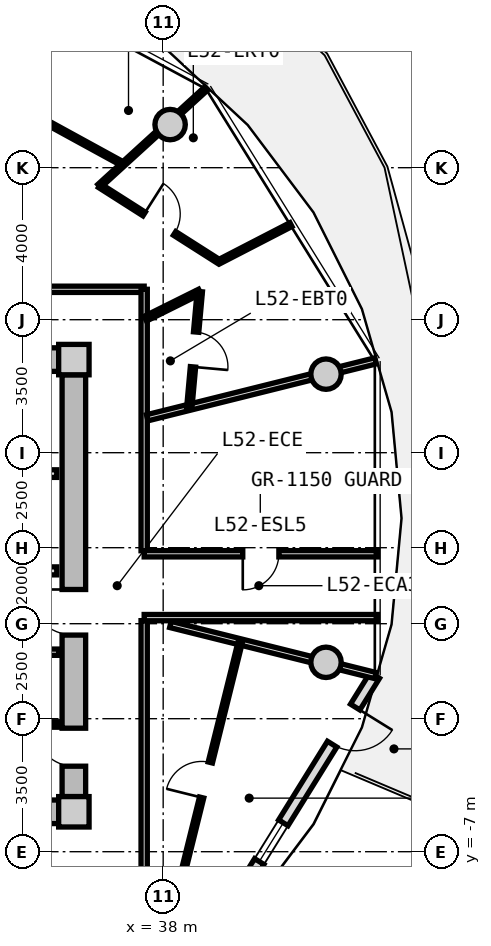
"""IFC4 building model, lengths in metres.
Left out: names, types, materials, properties, quantities, classifications, styles, units other than length and angle.
Written with IfcOpenShell. Run it as: python <this file> out.ifc"""

import sys

from ifc_helpers import new_model, si_unit, direction, frame, frame_2d, origin, origin_2d, place, context, subcontext, project, spatial, rectangle, circle, extrude, source, transform, mapped, element, fill, save


model = new_model("IFC4")
c1 = context("Model", 3, precision=1e-05, world=origin(), true_north=direction((0.0, 1.0)))
c2 = subcontext(c1, "Body", "Model", "MODEL_VIEW")
j1 = project(units=[si_unit("LENGTHUNIT", "METRE"), si_unit("PLANEANGLEUNIT", "RADIAN")], contexts=[c1])
p1 = place(None, origin())
s1 = spatial("IfcSite", under=j1, at=p1, CompositionType="ELEMENT")
p2 = place(p1, origin())
s2 = spatial("IfcBuilding", under=s1, at=p2, CompositionType="ELEMENT")
p3 = place(p2, frame((0.0, 0.0, 167.85)))
s3 = spatial("IfcBuildingStorey", under=s2, at=p3, CompositionType="ELEMENT", Elevation=167.85)
m1 = source(origin(), c2, "Body", "SweptSolid", [
    extrude(rectangle(XDim=0.8, YDim=0.8, at=origin_2d()), origin(), (0.0, 0.0, 1.0), 3.05),
])
for number, where, z_axis, x_axis in (
    (1, (35.65, -5.95, 0.0), (0.0, 0.0, 1.0), (1.0, 0.0, 0.0)),
    (2, (35.65, 5.95, 0.0), (0.0, 0.0, 1.0), (1.0, 0.0, 0.0)),
):
    element("IfcColumn", number, at=place(p3, frame(where, z_axis=z_axis, x_axis=x_axis)), inside=s3, PredefinedType="COLUMN", context=c2, shape_type="MappedRepresentation", body=[
        mapped(m1, transform((0.0, 0.0, 0.0), x_axis=(1.0, 0.0, 0.0), y_axis=(0.0, 1.0, 0.0), z_axis=(0.0, 0.0, 1.0), scale=1.0)),
    ])
m2 = source(origin(), c2, "Body", "SweptSolid", [
    extrude(rectangle(XDim=14.5, YDim=0.62, at=frame_2d((7.25, 0.0))), origin(), (0.0, 0.0, 1.0), 2.81),
])
for number, where, z_axis, x_axis in (
    (3, (20.75, 5.95, 0.0), (0.0, 0.0, 1.0), (1.0, 0.0, 0.0)),
    (4, (35.25, -5.95, 0.0), (0.0, 0.0, 1.0), (-1.0, 0.0, 0.0)),
):
    element("IfcWall", number, at=place(p3, frame(where, z_axis=z_axis, x_axis=x_axis)), inside=s3, PredefinedType="SHEAR", context=c2, shape_type="MappedRepresentation", body=[
        mapped(m2, transform((0.0, 0.0, 0.0), x_axis=(1.0, 0.0, 0.0), y_axis=(0.0, 1.0, 0.0), z_axis=(0.0, 0.0, 1.0), scale=1.0)),
    ])
m3 = source(origin(), c2, "Body", "SweptSolid", [
    extrude(rectangle(XDim=11.1, YDim=0.62, at=frame_2d((5.55, 0.0))), origin(), (0.0, 0.0, 1.0), 2.81),
])
p4 = place(p3, frame((35.65, 5.55, 0.0), z_axis=(0.0, 0.0, 1.0), x_axis=(0.0, -1.0, 0.0)))
e5 = element("IfcWall", 5, at=p4, inside=s3, PredefinedType="SHEAR", context=c2, shape_type="MappedRepresentation", body=[
    mapped(m3, transform((0.0, 0.0, 0.0), x_axis=(1.0, 0.0, 0.0), y_axis=(0.0, 1.0, 0.0), z_axis=(0.0, 0.0, 1.0), scale=1.0)),
])
p5 = place(p4, frame((5.65, 0.0, 0.0)))
e6 = element("IfcOpeningElement", 6, at=p5, cuts=e5, PredefinedType="OPENING", context=c2, shape_type="SweptSolid", body=[
    extrude(rectangle(XDim=1.2, YDim=2.15, at=frame_2d((0.6, 1.075))), frame((0.0, 0.32, 0.0), z_axis=(0.0, -1.0, 0.0), x_axis=(1.0, 0.0, 0.0)), (0.0, 0.0, 1.0), 0.64),
])
p6 = place(p4, frame((9.3, 0.0, 0.0)))
e7 = element("IfcOpeningElement", 7, at=p6, cuts=e5, PredefinedType="OPENING", context=c2, shape_type="SweptSolid", body=[
    extrude(rectangle(XDim=1.0, YDim=2.1, at=frame_2d((0.5, 1.05))), frame((0.0, 0.32, 0.0), z_axis=(0.0, -1.0, 0.0), x_axis=(1.0, 0.0, 0.0)), (0.0, 0.0, 1.0), 0.64),
])
m4 = source(origin(), c2, "Body", "SweptSolid", [
    extrude(circle(Radius=0.4, at=origin_2d()), origin(), (0.0, 0.0, 1.0), 3.05),
])
for number, where, z_axis, x_axis in (
    (8, (42.285, 5.567, 0.0), (0.0, 0.0, 1.0), (1.0, 0.0, 0.0)),
    (9, (38.183, 12.135, 0.0), (0.0, 0.0, 1.0), (1.0, 0.0, 0.0)),
    (10, (42.285, -2.016, 0.0), (0.0, 0.0, 1.0), (1.0, 0.0, 0.0)),
):
    element("IfcColumn", number, at=place(p3, frame(where, z_axis=z_axis, x_axis=x_axis)), inside=s3, PredefinedType="COLUMN", context=c2, shape_type="MappedRepresentation", body=[
        mapped(m4, transform((0.0, 0.0, 0.0), x_axis=(1.0, 0.0, 0.0), y_axis=(0.0, 1.0, 0.0), z_axis=(0.0, 0.0, 1.0), scale=1.0)),
    ])
m5 = source(origin(), c2, "Body", "SweptSolid", [
    extrude(rectangle(XDim=8.431, YDim=0.29, at=frame_2d((4.216, 0.0))), origin(), (0.0, 0.0, 1.0), 2.81),
])
p7 = place(p3, frame((43.57, -2.361, 0.0), z_axis=(0.0, 0.0, 1.0), x_axis=(-0.527377998418, -0.849630770855, 0.0)))
e11 = element("IfcWall", 11, at=p7, inside=s3, PredefinedType="SOLIDWALL", context=c2, shape_type="MappedRepresentation", body=[
    mapped(m5, transform((0.0, 0.0, 0.0), x_axis=(1.0, 0.0, 0.0), y_axis=(0.0, 1.0, 0.0), z_axis=(0.0, 0.0, 1.0), scale=1.0)),
])
p8 = place(p7, frame((0.98, 0.0, 0.0)))
e12 = element("IfcOpeningElement", 12, at=p8, cuts=e11, PredefinedType="OPENING", context=c2, shape_type="SweptSolid", body=[
    extrude(rectangle(XDim=1.15, YDim=2.25, at=frame_2d((0.575, 1.125))), frame((0.0, 0.155, 0.0), z_axis=(0.0, -1.0, 0.0), x_axis=(1.0, 0.0, 0.0)), (0.0, 0.0, 1.0), 0.31),
])
p9 = place(p7, frame((4.566, 0.0, 0.85)))
e13 = element("IfcOpeningElement", 13, at=p9, cuts=e11, PredefinedType="OPENING", context=c2, shape_type="SweptSolid", body=[
    extrude(rectangle(XDim=1.2, YDim=1.5, at=frame_2d((0.6, 0.75))), frame((0.0, 0.155, 0.0), z_axis=(0.0, -1.0, 0.0), x_axis=(1.0, 0.0, 0.0)), (0.0, 0.0, 1.0), 0.31),
])
m6 = source(origin(), c2, "Body", "SweptSolid", [
    extrude(rectangle(XDim=3.2, YDim=0.2, at=frame_2d((1.6, 0.0))), origin(), (0.0, 0.0, 1.0), 2.795),
])
p10 = place(p3, frame((32.0, 2.95, 0.0), z_axis=(0.0, 0.0, 1.0), x_axis=(1.0, 0.0, 0.0)))
e14 = element("IfcWall", 14, at=p10, inside=s3, PredefinedType="PARTITIONING", context=c2, shape_type="MappedRepresentation", body=[
    mapped(m6, transform((0.0, 0.0, 0.0), x_axis=(1.0, 0.0, 0.0), y_axis=(0.0, 1.0, 0.0), z_axis=(0.0, 0.0, 1.0), scale=1.0)),
])
m7 = source(origin(), c2, "Body", "SweptSolid", [
    extrude(rectangle(XDim=6.66, YDim=0.21, at=frame_2d((3.33, 0.0))), origin(), (0.0, 0.0, 1.0), 2.795),
])
p11 = place(p3, frame((28.54, 0.39, 0.0), z_axis=(0.0, 0.0, 1.0), x_axis=(1.0, 0.0, 0.0)))
e15 = element("IfcWall", 15, at=p11, inside=s3, PredefinedType="PARTITIONING", context=c2, shape_type="MappedRepresentation", body=[
    mapped(m7, transform((0.0, 0.0, 0.0), x_axis=(1.0, 0.0, 0.0), y_axis=(0.0, 1.0, 0.0), z_axis=(0.0, 0.0, 1.0), scale=1.0)),
])
p12 = place(p11, frame((1.0, 0.0, 0.0)))
e16 = element("IfcOpeningElement", 16, at=p12, cuts=e15, PredefinedType="OPENING", context=c2, shape_type="SweptSolid", body=[
    extrude(rectangle(XDim=1.2, YDim=2.15, at=frame_2d((0.6, 1.075))), frame((0.0, 0.115, 0.0), z_axis=(0.0, -1.0, 0.0), x_axis=(1.0, 0.0, 0.0)), (0.0, 0.0, 1.0), 0.23),
])
m8 = source(origin(), c2, "Body", "SweptSolid", [
    extrude(rectangle(XDim=2.7, YDim=0.165, at=frame_2d((1.35, 0.0))), origin(), (0.0, 0.0, 1.0), 2.795),
])
p13 = place(p3, frame((32.55, -1.75, 0.0), z_axis=(0.0, 0.0, 1.0), x_axis=(1.0, 0.0, 0.0)))
e17 = element("IfcWall", 17, at=p13, inside=s3, PredefinedType="PARTITIONING", context=c2, shape_type="MappedRepresentation", body=[
    mapped(m8, transform((0.0, 0.0, 0.0), x_axis=(1.0, 0.0, 0.0), y_axis=(0.0, 1.0, 0.0), z_axis=(0.0, 0.0, 1.0), scale=1.0)),
])
p14 = place(p13, frame((0.85, 0.0, 0.0)))
e18 = element("IfcOpeningElement", 18, at=p14, cuts=e17, PredefinedType="OPENING", context=c2, shape_type="SweptSolid", body=[
    extrude(rectangle(XDim=0.925, YDim=2.1, at=frame_2d((0.462, 1.05))), frame((0.0, 0.093, 0.0), z_axis=(0.0, -1.0, 0.0), x_axis=(1.0, 0.0, 0.0)), (0.0, 0.0, 1.0), 0.185),
])
m9 = source(origin(), c2, "Body", "SweptSolid", [
    extrude(rectangle(XDim=2.7, YDim=0.14, at=frame_2d((1.35, 0.0))), origin(), (0.0, 0.0, 1.0), 2.795),
])
p15 = place(p3, frame((32.55, -3.65, 0.0), z_axis=(0.0, 0.0, 1.0), x_axis=(1.0, 0.0, 0.0)))
e19 = element("IfcWall", 19, at=p15, inside=s3, PredefinedType="PARTITIONING", context=c2, shape_type="MappedRepresentation", body=[
    mapped(m9, transform((0.0, 0.0, 0.0), x_axis=(1.0, 0.0, 0.0), y_axis=(0.0, 1.0, 0.0), z_axis=(0.0, 0.0, 1.0), scale=1.0)),
])
m10 = source(origin(), c2, "Body", "SweptSolid", [
    extrude(rectangle(XDim=8.719, YDim=0.165, at=frame_2d((4.36, 0.0))), origin(), (0.0, 0.0, 1.0), 2.795),
])
p16 = place(p3, frame((28.781, 7.8, 0.0), z_axis=(0.0, 0.0, 1.0), x_axis=(1.0, 0.0, 0.0)))
e20 = element("IfcWall", 20, at=p16, inside=s3, PredefinedType="PARTITIONING", context=c2, shape_type="MappedRepresentation", body=[
    mapped(m10, transform((0.0, 0.0, 0.0), x_axis=(1.0, 0.0, 0.0), y_axis=(0.0, 1.0, 0.0), z_axis=(0.0, 0.0, 1.0), scale=1.0)),
])
p17 = place(p16, frame((3.835, 0.0, 0.0)))
e21 = element("IfcOpeningElement", 21, at=p17, cuts=e20, PredefinedType="OPENING", context=c2, shape_type="SweptSolid", body=[
    extrude(rectangle(XDim=1.05, YDim=2.15, at=frame_2d((0.525, 1.075))), frame((0.0, 0.093, 0.0), z_axis=(0.0, -1.0, 0.0), x_axis=(1.0, 0.0, 0.0)), (0.0, 0.0, 1.0), 0.185),
])
m11 = source(origin(), c2, "Body", "SweptSolid", [
    extrude(rectangle(XDim=6.88, YDim=0.165, at=frame_2d((3.44, 0.0))), origin(), (0.0, 0.0, 1.0), 2.795),
])
for number, where, z_axis, x_axis in (
    (22, (37.5, 7.8, 0.0), (0.0, 0.0, 1.0), (0.0, -1.0, 0.0)),
    (23, (37.5, -0.92, 0.0), (0.0, 0.0, 1.0), (0.0, -1.0, 0.0)),
):
    element("IfcWall", number, at=place(p3, frame(where, z_axis=z_axis, x_axis=x_axis)), inside=s3, PredefinedType="PARTITIONING", context=c2, shape_type="MappedRepresentation", body=[
        mapped(m11, transform((0.0, 0.0, 0.0), x_axis=(1.0, 0.0, 0.0), y_axis=(0.0, 1.0, 0.0), z_axis=(0.0, 0.0, 1.0), scale=1.0)),
    ])
m12 = source(origin(), c2, "Body", "SweptSolid", [
    extrude(rectangle(XDim=5.564, YDim=0.165, at=frame_2d((2.782, 0.0))), origin(), (0.0, 0.0, 1.0), 2.345),
])
p18 = place(p3, frame((38.19, -1.02, 0.0), z_axis=(0.0, 0.0, 1.0), x_axis=(0.97031260977, -0.241854169533, 0.0)))
e24 = element("IfcWall", 24, at=p18, inside=s3, PredefinedType="PARTITIONING", context=c2, shape_type="MappedRepresentation", body=[
    mapped(m12, transform((0.0, 0.0, 0.0), x_axis=(1.0, 0.0, 0.0), y_axis=(0.0, 1.0, 0.0), z_axis=(0.0, 0.0, 1.0), scale=1.0)),
])
m13 = source(origin(), c2, "Body", "SweptSolid", [
    extrude(rectangle(XDim=6.193, YDim=0.165, at=frame_2d((3.096, 0.0))), origin(), (0.0, 0.0, 1.0), 2.345),
])
p19 = place(p3, frame((37.58, 4.419, 0.0), z_axis=(0.0, 0.0, 1.0), x_axis=(0.970309243466, 0.241867674657, 0.0)))
e25 = element("IfcWall", 25, at=p19, inside=s3, PredefinedType="PARTITIONING", context=c2, shape_type="MappedRepresentation", body=[
    mapped(m13, transform((0.0, 0.0, 0.0), x_axis=(1.0, 0.0, 0.0), y_axis=(0.0, 1.0, 0.0), z_axis=(0.0, 0.0, 1.0), scale=1.0)),
])
m14 = source(origin(), c2, "Body", "SweptSolid", [
    extrude(rectangle(XDim=6.139, YDim=0.165, at=frame_2d((3.069, 0.0))), origin(), (0.0, 0.0, 1.0), 2.795),
])
p20 = place(p3, frame((37.5, 0.84, 0.0), z_axis=(0.0, 0.0, 1.0), x_axis=(1.0, 0.0, 0.0)))
e26 = element("IfcWall", 26, at=p20, inside=s3, PredefinedType="PARTITIONING", context=c2, shape_type="MappedRepresentation", body=[
    mapped(m14, transform((0.0, 0.0, 0.0), x_axis=(1.0, 0.0, 0.0), y_axis=(0.0, 1.0, 0.0), z_axis=(0.0, 0.0, 1.0), scale=1.0)),
])
p21 = place(p20, frame((2.594, 0.0, 0.0)))
e27 = element("IfcOpeningElement", 27, at=p21, cuts=e26, PredefinedType="OPENING", context=c2, shape_type="SweptSolid", body=[
    extrude(rectangle(XDim=0.95, YDim=2.1, at=frame_2d((0.475, 1.05))), frame((0.0, 0.093, 0.0), z_axis=(0.0, -1.0, 0.0), x_axis=(1.0, 0.0, 0.0)), (0.0, 0.0, 1.0), 0.185),
])
p22 = place(p3, frame((43.639, -0.84, 0.0), z_axis=(0.0, 0.0, 1.0), x_axis=(-1.0, 0.0, 0.0)))
e28 = element("IfcWall", 28, at=p22, inside=s3, PredefinedType="PARTITIONING", context=c2, shape_type="MappedRepresentation", body=[
    mapped(m14, transform((0.0, 0.0, 0.0), x_axis=(1.0, 0.0, 0.0), y_axis=(0.0, 1.0, 0.0), z_axis=(0.0, 0.0, 1.0), scale=1.0)),
])
m15 = source(origin(), c2, "Body", "SweptSolid", [
    extrude(rectangle(XDim=7.167, YDim=0.115, at=frame_2d((3.583, 0.0))), origin(), (0.0, 0.0, 1.0), 2.795),
])
p23 = place(p3, frame((36.939, 11.098, 0.0), z_axis=(0.0, 0.0, 1.0), x_axis=(-0.8771628907, 0.480192943699, 0.0)))
e29 = element("IfcWall", 29, at=p23, inside=s3, PredefinedType="PARTITIONING", context=c2, shape_type="MappedRepresentation", body=[
    mapped(m15, transform((0.0, 0.0, 0.0), x_axis=(1.0, 0.0, 0.0), y_axis=(0.0, 1.0, 0.0), z_axis=(0.0, 0.0, 1.0), scale=1.0)),
])
p24 = place(p23, frame((3.108, 0.0, 0.0)))
e30 = element("IfcOpeningElement", 30, at=p24, cuts=e29, PredefinedType="OPENING", context=c2, shape_type="SweptSolid", body=[
    extrude(rectangle(XDim=0.95, YDim=2.1, at=frame_2d((0.475, 1.05))), frame((0.0, 0.067, 0.0), z_axis=(0.0, -1.0, 0.0), x_axis=(1.0, 0.0, 0.0)), (0.0, 0.0, 1.0), 0.135),
])
m16 = source(origin(), c2, "Body", "SweptSolid", [
    extrude(rectangle(XDim=3.814, YDim=0.115, at=frame_2d((1.907, 0.0))), origin(), (0.0, 0.0, 1.0), 2.435),
])
p25 = place(p3, frame((36.319, 10.518, 0.0), z_axis=(0.0, 0.0, 1.0), x_axis=(0.73871962024, 0.674012850524, 0.0)))
e31 = element("IfcWall", 31, at=p25, inside=s3, PredefinedType="PARTITIONING", context=c2, shape_type="MappedRepresentation", body=[
    mapped(m16, transform((0.0, 0.0, 0.0), x_axis=(1.0, 0.0, 0.0), y_axis=(0.0, 1.0, 0.0), z_axis=(0.0, 0.0, 1.0), scale=1.0)),
])
m17 = source(origin(), c2, "Body", "SweptSolid", [
    extrude(rectangle(XDim=1.601, YDim=0.14, at=frame_2d((0.801, 0.0))), origin(), (0.0, 0.0, 1.0), 2.795),
])
p26 = place(p3, frame((37.53, 7.026, 0.0), z_axis=(0.0, 0.0, 1.0), x_axis=(0.895279369592, 0.445505163138, 0.0)))
e32 = element("IfcWall", 32, at=p26, inside=s3, PredefinedType="PARTITIONING", context=c2, shape_type="MappedRepresentation", body=[
    mapped(m17, transform((0.0, 0.0, 0.0), x_axis=(1.0, 0.0, 0.0), y_axis=(0.0, 1.0, 0.0), z_axis=(0.0, 0.0, 1.0), scale=1.0)),
])
m18 = source(origin(), c2, "Body", "SweptSolid", [
    extrude(rectangle(XDim=3.058, YDim=0.14, at=frame_2d((1.529, 0.0))), origin(), (0.0, 0.0, 1.0), 2.795),
])
p27 = place(p3, frame((38.964, 7.74, 0.0), z_axis=(0.0, 0.0, 1.0), x_axis=(-0.090060616512, -0.99593628579, 0.0)))
e33 = element("IfcWall", 33, at=p27, inside=s3, PredefinedType="PARTITIONING", context=c2, shape_type="MappedRepresentation", body=[
    mapped(m18, transform((0.0, 0.0, 0.0), x_axis=(1.0, 0.0, 0.0), y_axis=(0.0, 1.0, 0.0), z_axis=(0.0, 0.0, 1.0), scale=1.0)),
])
p28 = place(p27, frame((1.069, 0.0, 0.0)))
e34 = element("IfcOpeningElement", 34, at=p28, cuts=e33, PredefinedType="OPENING", context=c2, shape_type="SweptSolid", body=[
    extrude(rectangle(XDim=0.92, YDim=2.1, at=frame_2d((0.46, 1.05))), frame((0.0, 0.08, 0.0), z_axis=(0.0, -1.0, 0.0), x_axis=(1.0, 0.0, 0.0)), (0.0, 0.0, 1.0), 0.16),
])
m19 = source(origin(), c2, "Body", "SweptSolid", [
    extrude(rectangle(XDim=2.13, YDim=0.115, at=frame_2d((1.065, 0.0))), origin(), (0.0, 0.0, 1.0), 2.795),
])
p29 = place(p3, frame((39.471, 8.525, 0.0), z_axis=(0.0, 0.0, 1.0), x_axis=(0.888504584778, 0.458867740016, 0.0)))
e35 = element("IfcWall", 35, at=p29, inside=s3, PredefinedType="PARTITIONING", context=c2, shape_type="MappedRepresentation", body=[
    mapped(m19, transform((0.0, 0.0, 0.0), x_axis=(1.0, 0.0, 0.0), y_axis=(0.0, 1.0, 0.0), z_axis=(0.0, 0.0, 1.0), scale=1.0)),
])
m20 = source(origin(), c2, "Body", "SweptSolid", [
    extrude(rectangle(XDim=3.725, YDim=0.115, at=frame_2d((1.863, 0.0))), origin(), (0.0, 0.0, 1.0), 2.795),
])
p30 = place(p3, frame((39.471, 8.525, 0.0), z_axis=(0.0, 0.0, 1.0), x_axis=(-0.843453635564, 0.537201977523, 0.0)))
e36 = element("IfcWall", 36, at=p30, inside=s3, PredefinedType="PARTITIONING", context=c2, shape_type="MappedRepresentation", body=[
    mapped(m20, transform((0.0, 0.0, 0.0), x_axis=(1.0, 0.0, 0.0), y_axis=(0.0, 1.0, 0.0), z_axis=(0.0, 0.0, 1.0), scale=1.0)),
])
p31 = place(p30, frame((1.388, 0.0, 0.0)))
e37 = element("IfcOpeningElement", 37, at=p31, cuts=e36, PredefinedType="OPENING", context=c2, shape_type="SweptSolid", body=[
    extrude(rectangle(XDim=0.95, YDim=2.1, at=frame_2d((0.475, 1.05))), frame((0.0, 0.067, 0.0), z_axis=(0.0, -1.0, 0.0), x_axis=(1.0, 0.0, 0.0)), (0.0, 0.0, 1.0), 0.135),
])
m21 = source(origin(), c2, "Body", "SweptSolid", [
    extrude(rectangle(XDim=7.492, YDim=0.115, at=frame_2d((3.746, 0.0))), origin(), (0.0, 0.0, 1.0), 2.345),
])
p32 = place(p3, frame((38.223, -8.749, 0.0), z_axis=(0.0, 0.0, 1.0), x_axis=(0.24104782819, 0.970513237686, 0.0)))
e38 = element("IfcWall", 38, at=p32, inside=s3, PredefinedType="PARTITIONING", context=c2, shape_type="MappedRepresentation", body=[
    mapped(m21, transform((0.0, 0.0, 0.0), x_axis=(1.0, 0.0, 0.0), y_axis=(0.0, 1.0, 0.0), z_axis=(0.0, 0.0, 1.0), scale=1.0)),
])
p33 = place(p32, frame((3.271, 0.0, 0.0)))
e39 = element("IfcOpeningElement", 39, at=p33, cuts=e38, PredefinedType="OPENING", context=c2, shape_type="SweptSolid", body=[
    extrude(rectangle(XDim=0.95, YDim=2.1, at=frame_2d((0.475, 1.05))), frame((0.0, 0.067, 0.0), z_axis=(0.0, -1.0, 0.0), x_axis=(1.0, 0.0, 0.0)), (0.0, 0.0, 1.0), 0.135),
])
m22 = source(origin(), c2, "Body", "SweptSolid", [
    extrude(rectangle(XDim=1.15, YDim=2.25, at=frame_2d((0.575, 1.125))), frame((0.0, 0.025, 0.0), z_axis=(0.0, -1.0, 0.0), x_axis=(1.0, 0.0, 0.0)), (0.0, 0.0, 1.0), 0.05),
])
p34 = place(p8, origin())
e40 = element("IfcDoor", 40, at=p34, inside=s3, OperationType="SINGLE_SWING_LEFT", PredefinedType="DOOR", context=c2, shape_type="MappedRepresentation", body=[
    mapped(m22, transform((0.0, 0.0, 0.0), x_axis=(1.0, 0.0, 0.0), y_axis=(0.0, 1.0, 0.0), z_axis=(0.0, 0.0, 1.0), scale=1.0)),
])
fill(e12, e40)
m23 = source(origin(), c2, "Body", "SweptSolid", [
    extrude(rectangle(XDim=1.2, YDim=1.5, at=frame_2d((0.6, 0.75))), frame((0.0, 0.03, 0.0), z_axis=(0.0, -1.0, 0.0), x_axis=(1.0, 0.0, 0.0)), (0.0, 0.0, 1.0), 0.06),
])
p35 = place(p9, origin())
e41 = element("IfcWindow", 41, at=p35, inside=s3, PartitioningType="SINGLE_PANEL", PredefinedType="WINDOW", context=c2, shape_type="MappedRepresentation", body=[
    mapped(m23, transform((0.0, 0.0, 0.0), x_axis=(1.0, 0.0, 0.0), y_axis=(0.0, 1.0, 0.0), z_axis=(0.0, 0.0, 1.0), scale=1.0)),
])
fill(e13, e41)
m24 = source(origin(), c2, "Body", "SweptSolid", [
    extrude(rectangle(XDim=1.2, YDim=2.15, at=frame_2d((0.6, 1.075))), frame((0.0, 0.025, 0.0), z_axis=(0.0, -1.0, 0.0), x_axis=(1.0, 0.0, 0.0)), (0.0, 0.0, 1.0), 0.05),
])
p36 = place(p5, frame((1.2, 0.0, 0.0), z_axis=(0.0, 0.0, 1.0), x_axis=(-1.0, 0.0, 0.0)))
e42 = element("IfcDoor", 42, at=p36, inside=s3, OperationType="SINGLE_SWING_RIGHT", PredefinedType="DOOR", context=c2, shape_type="MappedRepresentation", body=[
    mapped(m24, transform((0.0, 0.0, 0.0), x_axis=(1.0, 0.0, 0.0), y_axis=(0.0, 1.0, 0.0), z_axis=(0.0, 0.0, 1.0), scale=1.0)),
])
fill(e6, e42)
m25 = source(origin(), c2, "Body", "SweptSolid", [
    extrude(rectangle(XDim=1.0, YDim=2.1, at=frame_2d((0.5, 1.05))), frame((0.0, 0.025, 0.0), z_axis=(0.0, -1.0, 0.0), x_axis=(1.0, 0.0, 0.0)), (0.0, 0.0, 1.0), 0.05),
])
p37 = place(p6, frame((1.0, 0.0, 0.0), z_axis=(0.0, 0.0, 1.0), x_axis=(-1.0, 0.0, 0.0)))
e43 = element("IfcDoor", 43, at=p37, inside=s3, OperationType="SINGLE_SWING_RIGHT", PredefinedType="DOOR", context=c2, shape_type="MappedRepresentation", body=[
    mapped(m25, transform((0.0, 0.0, 0.0), x_axis=(1.0, 0.0, 0.0), y_axis=(0.0, 1.0, 0.0), z_axis=(0.0, 0.0, 1.0), scale=1.0)),
])
fill(e7, e43)
m26 = source(origin(), c2, "Body", "SweptSolid", [
    extrude(rectangle(XDim=0.95, YDim=2.1, at=frame_2d((0.475, 1.05))), frame((0.0, 0.025, 0.0), z_axis=(0.0, -1.0, 0.0), x_axis=(1.0, 0.0, 0.0)), (0.0, 0.0, 1.0), 0.05),
])
p38 = place(p21, frame((0.95, 0.0, 0.0), z_axis=(0.0, 0.0, 1.0), x_axis=(-1.0, 0.0, 0.0)))
e44 = element("IfcDoor", 44, at=p38, inside=s3, OperationType="SINGLE_SWING_RIGHT", PredefinedType="DOOR", context=c2, shape_type="MappedRepresentation", body=[
    mapped(m26, transform((0.0, 0.0, 0.0), x_axis=(1.0, 0.0, 0.0), y_axis=(0.0, 1.0, 0.0), z_axis=(0.0, 0.0, 1.0), scale=1.0)),
])
fill(e27, e44)
m27 = source(origin(), c2, "Body", "SweptSolid", [
    extrude(rectangle(XDim=0.92, YDim=2.1, at=frame_2d((0.46, 1.05))), frame((0.0, 0.025, 0.0), z_axis=(0.0, -1.0, 0.0), x_axis=(1.0, 0.0, 0.0)), (0.0, 0.0, 1.0), 0.05),
])
p39 = place(p28, origin())
e45 = element("IfcDoor", 45, at=p39, inside=s3, OperationType="SINGLE_SWING_RIGHT", PredefinedType="DOOR", context=c2, shape_type="MappedRepresentation", body=[
    mapped(m27, transform((0.0, 0.0, 0.0), x_axis=(1.0, 0.0, 0.0), y_axis=(0.0, 1.0, 0.0), z_axis=(0.0, 0.0, 1.0), scale=1.0)),
])
fill(e34, e45)
p40 = place(p31, frame((0.95, 0.0, 0.0), z_axis=(0.0, 0.0, 1.0), x_axis=(-1.0, 0.0, 0.0)))
e46 = element("IfcDoor", 46, at=p40, inside=s3, OperationType="SINGLE_SWING_LEFT", PredefinedType="DOOR", context=c2, shape_type="MappedRepresentation", body=[
    mapped(m26, transform((0.0, 0.0, 0.0), x_axis=(1.0, 0.0, 0.0), y_axis=(0.0, 1.0, 0.0), z_axis=(0.0, 0.0, 1.0), scale=1.0)),
])
fill(e37, e46)
p41 = place(p33, origin())
e47 = element("IfcDoor", 47, at=p41, inside=s3, OperationType="SINGLE_SWING_LEFT", PredefinedType="DOOR", context=c2, shape_type="MappedRepresentation", body=[
    mapped(m26, transform((0.0, 0.0, 0.0), x_axis=(1.0, 0.0, 0.0), y_axis=(0.0, 1.0, 0.0), z_axis=(0.0, 0.0, 1.0), scale=1.0)),
])
fill(e39, e47)
save(model, sys.argv[1])
